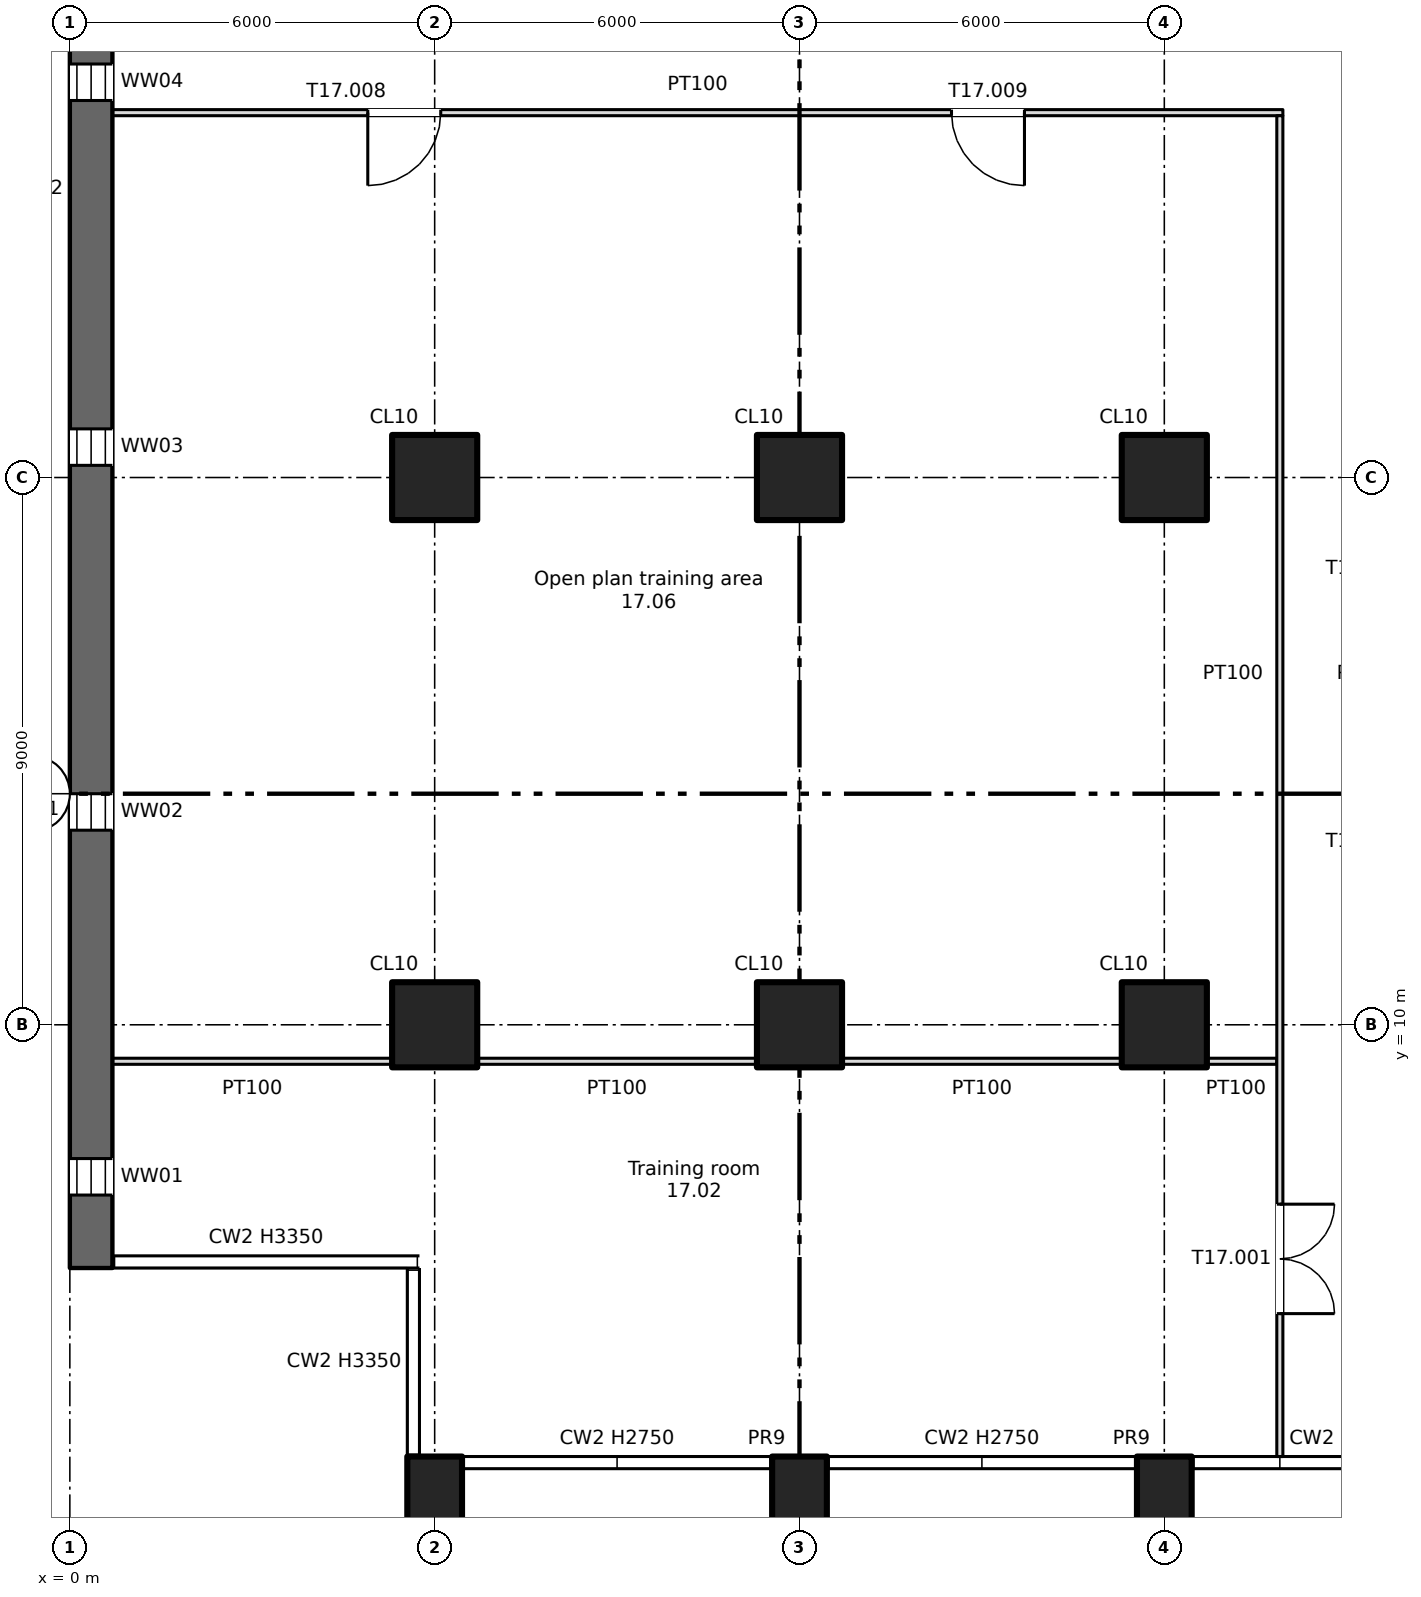
"""IFC4 building model, lengths in metres.
Left out: names, types, materials, properties, quantities, classifications, styles, units other than length and angle.
Written with IfcOpenShell. Run it as: python <this file> out.ifc"""

import sys

from ifc_helpers import new_model, si_unit, direction, frame, frame_2d, origin, origin_2d, place, context, subcontext, project, spatial, rectangle, extrude, element, fill, save


model = new_model("IFC4")
c1 = context("Model", 3, precision=1e-05, world=origin(), true_north=direction((0.0, 1.0)))
c2 = subcontext(c1, "Body", "Model", "MODEL_VIEW")
j1 = project(units=[si_unit("LENGTHUNIT", "METRE"), si_unit("PLANEANGLEUNIT", "RADIAN")], contexts=[c1])
p1 = place(None, origin())
s1 = spatial("IfcSite", under=j1, at=p1, CompositionType="ELEMENT")
p2 = place(p1, origin())
s2 = spatial("IfcBuilding", under=s1, at=p2, CompositionType="ELEMENT")
p3 = place(p2, frame((0.0, 0.0, 110.0)))
s3 = spatial("IfcBuildingStorey", under=s2, at=p3, CompositionType="ELEMENT", Elevation=110.0)
for number, where, z_axis, x_axis in (
    (1, (6.0, 2.2, -0.4), (0.0, 0.0, 1.0), (1.0, 0.0, 0.0)),
    (2, (12.0, 2.2, -0.4), (0.0, 0.0, 1.0), (1.0, 0.0, 0.0)),
    (3, (18.0, 2.2, -0.4), (0.0, 0.0, 1.0), (1.0, 0.0, 0.0)),
):
    element("IfcColumn", number, at=place(p3, frame(where, z_axis=z_axis, x_axis=x_axis)), inside=s3, PredefinedType="COLUMN", context=c2, shape_type="SweptSolid", body=[
        extrude(rectangle(XDim=0.9, YDim=1.4, at=origin_2d()), origin(), (0.0, 0.0, 1.0), 3.75),
    ])
for number, where, z_axis, x_axis in (
    (4, (6.0, 10.0, 0.0), (0.0, 0.0, 1.0), (1.0, 0.0, 0.0)),
    (5, (6.0, 19.0, 0.0), (0.0, 0.0, 1.0), (1.0, 0.0, 0.0)),
    (6, (12.0, 10.0, 0.0), (0.0, 0.0, 1.0), (1.0, 0.0, 0.0)),
    (7, (12.0, 19.0, 0.0), (0.0, 0.0, 1.0), (1.0, 0.0, 0.0)),
    (8, (18.0, 10.0, 0.0), (0.0, 0.0, 1.0), (1.0, 0.0, 0.0)),
    (9, (18.0, 19.0, 0.0), (0.0, 0.0, 1.0), (1.0, 0.0, 0.0)),
):
    element("IfcColumn", number, at=place(p3, frame(where, z_axis=z_axis, x_axis=x_axis)), inside=s3, PredefinedType="COLUMN", context=c2, shape_type="SweptSolid", body=[
        extrude(rectangle(XDim=1.4, YDim=1.4, at=origin_2d()), origin(), (0.0, 0.0, 1.0), 3.35),
    ])
p4 = place(p3, frame((0.35, 6.0, 0.0), z_axis=(0.0, 0.0, 1.0), x_axis=(0.0, 1.0, 0.0)))
e10 = element("IfcWall", 10, at=p4, inside=s3, PredefinedType="SHEAR", context=c2, shape_type="SweptSolid", body=[
    extrude(rectangle(XDim=35.5, YDim=0.7, at=frame_2d((17.75, 0.0))), origin(), (0.0, 0.0, 1.0), 3.35),
])
p5 = place(p4, frame((1.2, 0.0, 0.6)))
e11 = element("IfcOpeningElement", 11, at=p5, cuts=e10, PredefinedType="OPENING", context=c2, shape_type="SweptSolid", body=[
    extrude(rectangle(XDim=0.6, YDim=2.4, at=frame_2d((0.3, 1.2))), frame((0.0, 0.36, 0.0), z_axis=(0.0, -1.0, 0.0), x_axis=(1.0, 0.0, 0.0)), (0.0, 0.0, 1.0), 0.72),
])
p6 = place(p4, frame((7.2, 0.0, 0.6)))
e12 = element("IfcOpeningElement", 12, at=p6, cuts=e10, PredefinedType="OPENING", context=c2, shape_type="SweptSolid", body=[
    extrude(rectangle(XDim=0.6, YDim=2.4, at=frame_2d((0.3, 1.2))), frame((0.0, 0.36, 0.0), z_axis=(0.0, -1.0, 0.0), x_axis=(1.0, 0.0, 0.0)), (0.0, 0.0, 1.0), 0.72),
])
p7 = place(p4, frame((13.2, 0.0, 0.6)))
e13 = element("IfcOpeningElement", 13, at=p7, cuts=e10, PredefinedType="OPENING", context=c2, shape_type="SweptSolid", body=[
    extrude(rectangle(XDim=0.6, YDim=2.4, at=frame_2d((0.3, 1.2))), frame((0.0, 0.36, 0.0), z_axis=(0.0, -1.0, 0.0), x_axis=(1.0, 0.0, 0.0)), (0.0, 0.0, 1.0), 0.72),
])
p8 = place(p4, frame((19.2, 0.0, 0.6)))
e14 = element("IfcOpeningElement", 14, at=p8, cuts=e10, PredefinedType="OPENING", context=c2, shape_type="SweptSolid", body=[
    extrude(rectangle(XDim=0.6, YDim=2.4, at=frame_2d((0.3, 1.2))), frame((0.0, 0.36, 0.0), z_axis=(0.0, -1.0, 0.0), x_axis=(1.0, 0.0, 0.0)), (0.0, 0.0, 1.0), 0.72),
])
p9 = place(p4, frame((25.2, 0.0, 0.6)))
e15 = element("IfcOpeningElement", 15, at=p9, cuts=e10, PredefinedType="OPENING", context=c2, shape_type="SweptSolid", body=[
    extrude(rectangle(XDim=0.6, YDim=2.4, at=frame_2d((0.3, 1.2))), frame((0.0, 0.36, 0.0), z_axis=(0.0, -1.0, 0.0), x_axis=(1.0, 0.0, 0.0)), (0.0, 0.0, 1.0), 0.72),
])
p10 = place(p4, frame((31.2, 0.0, 0.6)))
e16 = element("IfcOpeningElement", 16, at=p10, cuts=e10, PredefinedType="OPENING", context=c2, shape_type="SweptSolid", body=[
    extrude(rectangle(XDim=0.6, YDim=2.4, at=frame_2d((0.3, 1.2))), frame((0.0, 0.36, 0.0), z_axis=(0.0, -1.0, 0.0), x_axis=(1.0, 0.0, 0.0)), (0.0, 0.0, 1.0), 0.72),
])
p11 = place(p3, frame((18.7, 9.4, 0.0), z_axis=(0.0, 0.0, 1.0), x_axis=(1.0, 0.0, 0.0)))
e17 = element("IfcWall", 17, at=p11, inside=s3, PredefinedType="PARTITIONING", context=c2, shape_type="SweptSolid", body=[
    extrude(rectangle(XDim=1.15, YDim=0.1, at=frame_2d((0.575, 0.0))), origin(), (0.0, 0.0, 1.0), 3.35),
])
for number, where, z_axis, x_axis in (
    (18, (12.7, 9.4, 0.0), (0.0, 0.0, 1.0), (1.0, 0.0, 0.0)),
    (19, (6.7, 9.4, 0.0), (0.0, 0.0, 1.0), (1.0, 0.0, 0.0)),
    (20, (0.7, 9.4, 0.0), (0.0, 0.0, 1.0), (1.0, 0.0, 0.0)),
):
    element("IfcWall", number, at=place(p3, frame(where, z_axis=z_axis, x_axis=x_axis)), inside=s3, PredefinedType="PARTITIONING", context=c2, shape_type="SweptSolid", body=[
        extrude(rectangle(XDim=4.6, YDim=0.1, at=frame_2d((2.3, 0.0))), origin(), (0.0, 0.0, 1.0), 3.35),
    ])
p12 = place(p3, frame((0.7, 25.0, 0.0), z_axis=(0.0, 0.0, 1.0), x_axis=(1.0, 0.0, 0.0)))
e21 = element("IfcWall", 21, at=p12, inside=s3, PredefinedType="PARTITIONING", context=c2, shape_type="SweptSolid", body=[
    extrude(rectangle(XDim=19.25, YDim=0.1, at=frame_2d((9.625, 0.0))), origin(), (0.0, 0.0, 1.0), 3.35),
])
p13 = place(p12, frame((4.2, 0.0, 0.0)))
e22 = element("IfcOpeningElement", 22, at=p13, cuts=e21, PredefinedType="OPENING", context=c2, shape_type="SweptSolid", body=[
    extrude(rectangle(XDim=1.2, YDim=2.1, at=frame_2d((0.6, 1.05))), frame((0.0, 0.06, 0.0), z_axis=(0.0, -1.0, 0.0), x_axis=(1.0, 0.0, 0.0)), (0.0, 0.0, 1.0), 0.12),
])
p14 = place(p12, frame((13.8, 0.0, 0.0)))
e23 = element("IfcOpeningElement", 23, at=p14, cuts=e21, PredefinedType="OPENING", context=c2, shape_type="SweptSolid", body=[
    extrude(rectangle(XDim=1.2, YDim=2.1, at=frame_2d((0.6, 1.05))), frame((0.0, 0.06, 0.0), z_axis=(0.0, -1.0, 0.0), x_axis=(1.0, 0.0, 0.0)), (0.0, 0.0, 1.0), 0.12),
])
p15 = place(p3, frame((19.9, 2.9, 0.0), z_axis=(0.0, 0.0, 1.0), x_axis=(0.0, 1.0, 0.0)))
e24 = element("IfcWall", 24, at=p15, inside=s3, PredefinedType="PARTITIONING", context=c2, shape_type="SweptSolid", body=[
    extrude(rectangle(XDim=22.05, YDim=0.1, at=frame_2d((11.025, 0.0))), origin(), (0.0, 0.0, 1.0), 3.35),
])
p16 = place(p15, frame((2.35, 0.0, 0.0)))
e25 = element("IfcOpeningElement", 25, at=p16, cuts=e24, PredefinedType="OPENING", context=c2, shape_type="SweptSolid", body=[
    extrude(rectangle(XDim=1.8, YDim=2.1, at=frame_2d((0.9, 1.05))), frame((0.0, 0.06, 0.0), z_axis=(0.0, -1.0, 0.0), x_axis=(1.0, 0.0, 0.0)), (0.0, 0.0, 1.0), 0.12),
])
p17 = place(p5, origin())
e26 = element("IfcWindow", 26, at=p17, inside=s3, PartitioningType="SINGLE_PANEL", PredefinedType="WINDOW", context=c2, shape_type="SweptSolid", body=[
    extrude(rectangle(XDim=0.6, YDim=2.4, at=frame_2d((0.3, 1.2))), frame((0.0, 0.03, 0.0), z_axis=(0.0, -1.0, 0.0), x_axis=(1.0, 0.0, 0.0)), (0.0, 0.0, 1.0), 0.06),
])
fill(e11, e26)
p18 = place(p6, origin())
e27 = element("IfcWindow", 27, at=p18, inside=s3, PartitioningType="SINGLE_PANEL", PredefinedType="WINDOW", context=c2, shape_type="SweptSolid", body=[
    extrude(rectangle(XDim=0.6, YDim=2.4, at=frame_2d((0.3, 1.2))), frame((0.0, 0.03, 0.0), z_axis=(0.0, -1.0, 0.0), x_axis=(1.0, 0.0, 0.0)), (0.0, 0.0, 1.0), 0.06),
])
fill(e12, e27)
p19 = place(p7, origin())
e28 = element("IfcWindow", 28, at=p19, inside=s3, PartitioningType="SINGLE_PANEL", PredefinedType="WINDOW", context=c2, shape_type="SweptSolid", body=[
    extrude(rectangle(XDim=0.6, YDim=2.4, at=frame_2d((0.3, 1.2))), frame((0.0, 0.03, 0.0), z_axis=(0.0, -1.0, 0.0), x_axis=(1.0, 0.0, 0.0)), (0.0, 0.0, 1.0), 0.06),
])
fill(e13, e28)
p20 = place(p8, origin())
e29 = element("IfcWindow", 29, at=p20, inside=s3, PartitioningType="SINGLE_PANEL", PredefinedType="WINDOW", context=c2, shape_type="SweptSolid", body=[
    extrude(rectangle(XDim=0.6, YDim=2.4, at=frame_2d((0.3, 1.2))), frame((0.0, 0.03, 0.0), z_axis=(0.0, -1.0, 0.0), x_axis=(1.0, 0.0, 0.0)), (0.0, 0.0, 1.0), 0.06),
])
fill(e14, e29)
p21 = place(p16, origin())
e30 = element("IfcDoor", 30, at=p21, inside=s3, OperationType="DOUBLE_DOOR_SINGLE_SWING", PredefinedType="DOOR", context=c2, shape_type="SweptSolid", body=[
    extrude(rectangle(XDim=1.8, YDim=2.1, at=frame_2d((0.9, 1.05))), frame((0.0, 0.025, 0.0), z_axis=(0.0, -1.0, 0.0), x_axis=(1.0, 0.0, 0.0)), (0.0, 0.0, 1.0), 0.05),
])
fill(e25, e30)
p22 = place(p13, origin())
e31 = element("IfcDoor", 31, at=p22, inside=s3, OperationType="SINGLE_SWING_LEFT", PredefinedType="DOOR", context=c2, shape_type="SweptSolid", body=[
    extrude(rectangle(XDim=1.2, YDim=2.1, at=frame_2d((0.6, 1.05))), frame((0.0, 0.025, 0.0), z_axis=(0.0, -1.0, 0.0), x_axis=(1.0, 0.0, 0.0)), (0.0, 0.0, 1.0), 0.05),
])
fill(e22, e31)
p23 = place(p14, origin())
e32 = element("IfcDoor", 32, at=p23, inside=s3, OperationType="SINGLE_SWING_RIGHT", PredefinedType="DOOR", context=c2, shape_type="SweptSolid", body=[
    extrude(rectangle(XDim=1.2, YDim=2.1, at=frame_2d((0.6, 1.05))), frame((0.0, 0.025, 0.0), z_axis=(0.0, -1.0, 0.0), x_axis=(1.0, 0.0, 0.0)), (0.0, 0.0, 1.0), 0.05),
])
fill(e23, e32)
save(model, sys.argv[1])
